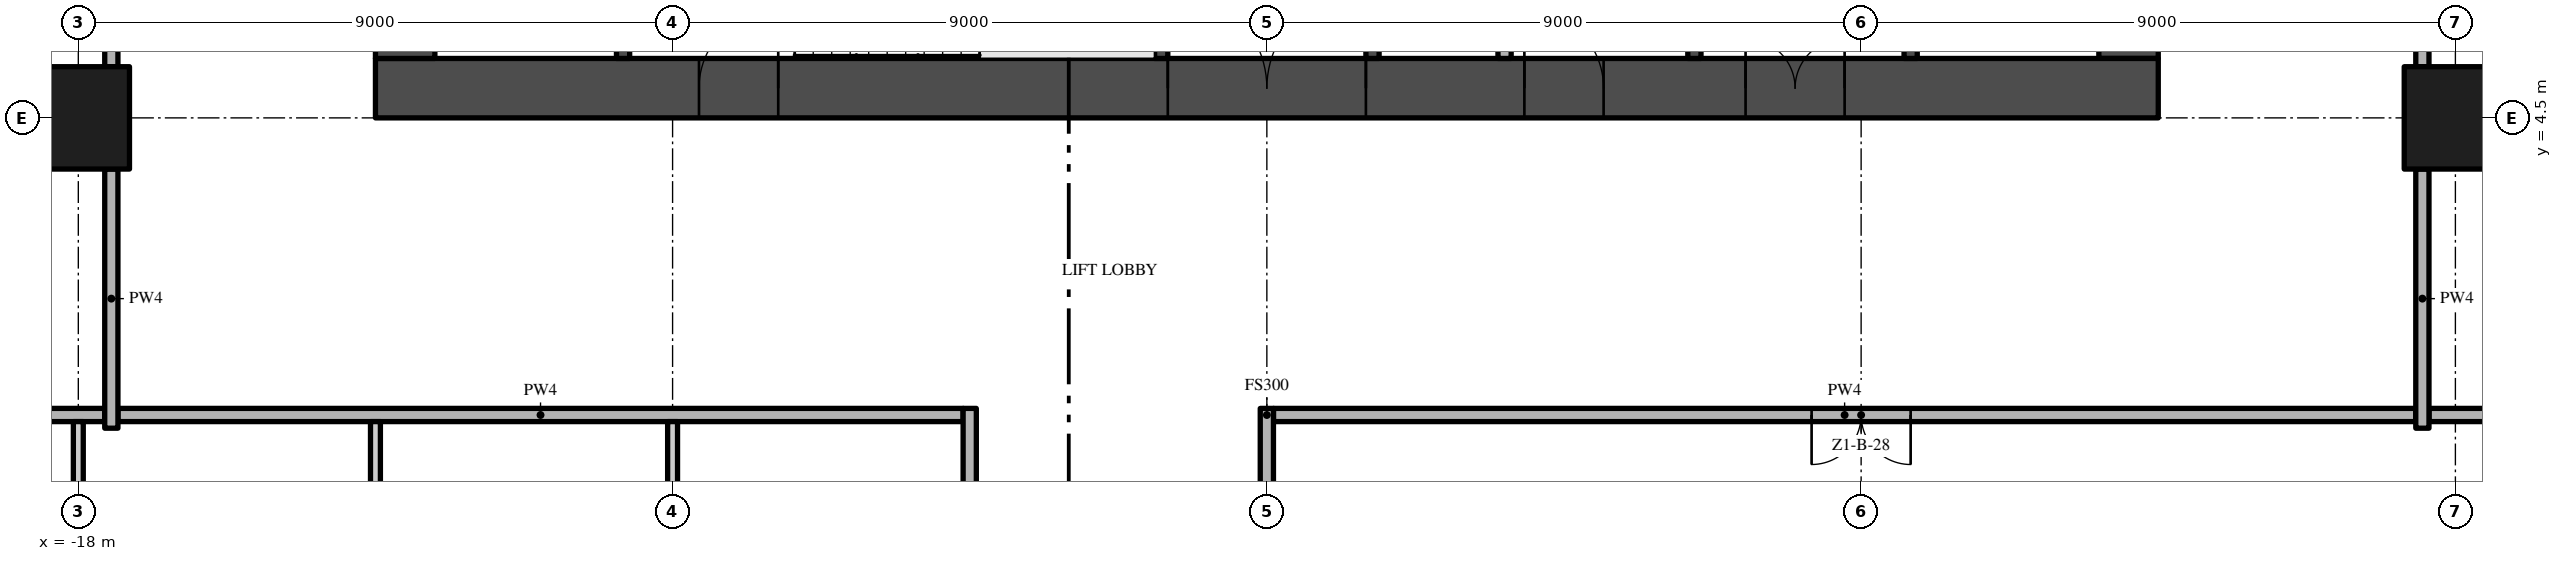
"""IFC4 building model, lengths in metres.
Left out: names, types, materials, properties, quantities, classifications, styles, units other than length and angle.
Written with IfcOpenShell. Run it as: python <this file> out.ifc"""

import sys

from ifc_helpers import new_model, si_unit, direction, frame, frame_2d, origin, origin_2d, place, context, subcontext, project, spatial, rectangle, extrude, element, fill, save


model = new_model("IFC4")
c1 = context("Model", 3, precision=1e-05, world=origin(), true_north=direction((0.0, 1.0)))
c2 = subcontext(c1, "Body", "Model", "MODEL_VIEW")
j1 = project(units=[si_unit("LENGTHUNIT", "METRE"), si_unit("PLANEANGLEUNIT", "RADIAN")], contexts=[c1])
p1 = place(None, origin())
s1 = spatial("IfcSite", under=j1, at=p1, CompositionType="ELEMENT")
p2 = place(p1, origin())
s2 = spatial("IfcBuilding", under=s1, at=p2, CompositionType="ELEMENT")
p3 = place(p2, frame((0.0, 0.0, 26.4)))
s3 = spatial("IfcBuildingStorey", under=s2, at=p3, CompositionType="ELEMENT", Elevation=26.4)
p4 = place(p3, frame((-13.5, 4.95, -0.3), z_axis=(0.0, 0.0, 1.0), x_axis=(1.0, 0.0, 0.0)))
e1 = element("IfcWall", 1, at=p4, inside=s3, PredefinedType="SHEAR", context=c2, shape_type="SweptSolid", body=[
    extrude(rectangle(XDim=27.0, YDim=0.9, at=frame_2d((13.5, 0.0))), origin(), (0.0, 0.0, 1.0), 3.8),
])
p5 = place(p4, frame((12.0, 0.0, 0.3)))
e2 = element("IfcOpeningElement", 2, at=p5, cuts=e1, PredefinedType="OPENING", context=c2, shape_type="SweptSolid", body=[
    extrude(rectangle(XDim=3.0, YDim=2.4, at=frame_2d((1.5, 1.2))), frame((0.0, 0.46, 0.0), z_axis=(0.0, -1.0, 0.0), x_axis=(1.0, 0.0, 0.0)), (0.0, 0.0, 1.0), 0.92),
])
p6 = place(p4, frame((4.9, 0.0, 0.3)))
e3 = element("IfcOpeningElement", 3, at=p6, cuts=e1, PredefinedType="OPENING", context=c2, shape_type="SweptSolid", body=[
    extrude(rectangle(XDim=1.2, YDim=2.2, at=frame_2d((0.6, 1.1))), frame((0.0, 0.46, 0.0), z_axis=(0.0, -1.0, 0.0), x_axis=(1.0, 0.0, 0.0)), (0.0, 0.0, 1.0), 0.92),
])
p7 = place(p4, frame((20.75, 0.0, 0.3)))
e4 = element("IfcOpeningElement", 4, at=p7, cuts=e1, PredefinedType="OPENING", context=c2, shape_type="SweptSolid", body=[
    extrude(rectangle(XDim=1.5, YDim=2.2, at=frame_2d((0.75, 1.1))), frame((0.0, 0.46, 0.0), z_axis=(0.0, -1.0, 0.0), x_axis=(1.0, 0.0, 0.0)), (0.0, 0.0, 1.0), 0.92),
])
p8 = place(p4, frame((17.4, 0.0, 0.3)))
e5 = element("IfcOpeningElement", 5, at=p8, cuts=e1, PredefinedType="OPENING", context=c2, shape_type="SweptSolid", body=[
    extrude(rectangle(XDim=1.2, YDim=2.2, at=frame_2d((0.6, 1.1))), frame((0.0, 0.46, 0.0), z_axis=(0.0, -1.0, 0.0), x_axis=(1.0, 0.0, 0.0)), (0.0, 0.0, 1.0), 0.92),
])
p9 = place(p3, frame((13.05, 5.4, -0.3), z_axis=(0.0, 0.0, 1.0), x_axis=(0.0, 1.0, 0.0)))
e6 = element("IfcWall", 6, at=p9, inside=s3, PredefinedType="SHEAR", context=c2, shape_type="SweptSolid", body=[
    extrude(rectangle(XDim=16.2, YDim=0.9, at=frame_2d((8.1, 0.0))), origin(), (0.0, 0.0, 1.0), 3.8),
])
p10 = place(p9, frame((6.0, 0.0, 0.3)))
e7 = element("IfcOpeningElement", 7, at=p10, cuts=e6, PredefinedType="OPENING", context=c2, shape_type="SweptSolid", body=[
    extrude(rectangle(XDim=1.2, YDim=2.2, at=frame_2d((0.6, 1.1))), frame((0.0, 0.46, 0.0), z_axis=(0.0, -1.0, 0.0), x_axis=(1.0, 0.0, 0.0)), (0.0, 0.0, 1.0), 0.92),
])
p11 = place(p3, frame((-13.05, 21.6, -0.3), z_axis=(0.0, 0.0, 1.0), x_axis=(0.0, -1.0, 0.0)))
e8 = element("IfcWall", 8, at=p11, inside=s3, PredefinedType="SHEAR", context=c2, shape_type="SweptSolid", body=[
    extrude(rectangle(XDim=16.2, YDim=0.9, at=frame_2d((8.1, 0.0))), origin(), (0.0, 0.0, 1.0), 3.8),
])
p12 = place(p11, frame((9.0, 0.0, 0.3)))
e9 = element("IfcOpeningElement", 9, at=p12, cuts=e8, PredefinedType="OPENING", context=c2, shape_type="SweptSolid", body=[
    extrude(rectangle(XDim=1.2, YDim=2.2, at=frame_2d((0.6, 1.1))), frame((0.0, 0.46, 0.0), z_axis=(0.0, -1.0, 0.0), x_axis=(1.0, 0.0, 0.0)), (0.0, 0.0, 1.0), 0.92),
])
for number, where, z_axis, x_axis in (
    (10, (-18.0, 4.5, 0.0), (0.0, 0.0, 1.0), (1.0, 0.0, 0.0)),
    (11, (18.0, 4.5, 0.0), (0.0, 0.0, 1.0), (1.0, 0.0, 0.0)),
):
    element("IfcColumn", number, at=place(p3, frame(where, z_axis=z_axis, x_axis=x_axis)), inside=s3, PredefinedType="COLUMN", context=c2, shape_type="SweptSolid", body=[
        extrude(rectangle(XDim=1.55, YDim=1.55, at=origin_2d()), origin(), (0.0, 0.0, 1.0), 3.5),
    ])
for number, where, z_axis, x_axis in (
    (12, (-9.75, 5.4, 0.0), (0.0, 0.0, 1.0), (0.0, 1.0, 0.0)),
    (13, (-1.6, 5.4, 0.0), (0.0, 0.0, 1.0), (0.0, 1.0, 0.0)),
):
    element("IfcWall", number, at=place(p3, frame(where, z_axis=z_axis, x_axis=x_axis)), inside=s3, PredefinedType="SHEAR", context=c2, shape_type="SweptSolid", body=[
        extrude(rectangle(XDim=2.55, YDim=0.2, at=frame_2d((1.275, 0.0))), origin(), (0.0, 0.0, 1.0), 3.5),
    ])
p13 = place(p3, frame((1.6, 13.5, 0.0), z_axis=(0.0, 0.0, 1.0), x_axis=(0.0, -1.0, 0.0)))
e14 = element("IfcWall", 14, at=p13, inside=s3, PredefinedType="SHEAR", context=c2, shape_type="SweptSolid", body=[
    extrude(rectangle(XDim=8.1, YDim=0.2, at=frame_2d((4.05, 0.0))), origin(), (0.0, 0.0, 1.0), 3.5),
])
p14 = place(p13, frame((3.2, 0.0, 0.0)))
e15 = element("IfcOpeningElement", 15, at=p14, cuts=e14, PredefinedType="OPENING", context=c2, shape_type="SweptSolid", body=[
    extrude(rectangle(XDim=0.9, YDim=2.1, at=frame_2d((0.45, 1.05))), frame((0.0, 0.11, 0.0), z_axis=(0.0, -1.0, 0.0), x_axis=(1.0, 0.0, 0.0)), (0.0, 0.0, 1.0), 0.22),
])
p15 = place(p3, frame((3.6, 13.5, 0.0), z_axis=(0.0, 0.0, 1.0), x_axis=(0.0, -1.0, 0.0)))
e16 = element("IfcWall", 16, at=p15, inside=s3, PredefinedType="PARTITIONING", context=c2, shape_type="SweptSolid", body=[
    extrude(rectangle(XDim=8.1, YDim=0.2, at=frame_2d((4.05, 0.0))), origin(), (0.0, 0.0, 1.0), 3.5),
])
p16 = place(p15, frame((3.6, 0.0, 0.0)))
e17 = element("IfcOpeningElement", 17, at=p16, cuts=e16, PredefinedType="OPENING", context=c2, shape_type="SweptSolid", body=[
    extrude(rectangle(XDim=0.9, YDim=2.1, at=frame_2d((0.45, 1.05))), frame((0.0, 0.11, 0.0), z_axis=(0.0, -1.0, 0.0), x_axis=(1.0, 0.0, 0.0)), (0.0, 0.0, 1.0), 0.22),
])
p17 = place(p3, frame((6.475, 5.4, 0.0), z_axis=(0.0, 0.0, 1.0), x_axis=(0.0, 1.0, 0.0)))
e18 = element("IfcWall", 18, at=p17, inside=s3, PredefinedType="SHEAR", context=c2, shape_type="SweptSolid", body=[
    extrude(rectangle(XDim=6.7, YDim=0.2, at=frame_2d((3.35, 0.0))), origin(), (0.0, 0.0, 1.0), 3.5),
])
p18 = place(p3, frame((9.75, 5.4, 0.0), z_axis=(0.0, 0.0, 1.0), x_axis=(0.0, 1.0, 0.0)))
e19 = element("IfcWall", 19, at=p18, inside=s3, PredefinedType="SHEAR", context=c2, shape_type="SweptSolid", body=[
    extrude(rectangle(XDim=2.2, YDim=0.2, at=frame_2d((1.1, 0.0))), origin(), (0.0, 0.0, 1.0), 3.5),
])
p19 = place(p18, frame((0.55, 0.0, 0.0)))
e20 = element("IfcOpeningElement", 20, at=p19, cuts=e19, PredefinedType="OPENING", context=c2, shape_type="SweptSolid", body=[
    extrude(rectangle(XDim=1.1, YDim=2.1, at=frame_2d((0.55, 1.05))), frame((0.0, 0.11, 0.0), z_axis=(0.0, -1.0, 0.0), x_axis=(1.0, 0.0, 0.0)), (0.0, 0.0, 1.0), 0.22),
])
p20 = place(p3, frame((-17.4, 0.0, 0.0), z_axis=(0.0, 0.0, 1.0), x_axis=(1.0, 0.0, 0.0)))
e21 = element("IfcWall", 21, at=p20, inside=s3, PredefinedType="PARTITIONING", context=c2, shape_type="SweptSolid", body=[
    extrude(rectangle(XDim=12.8, YDim=0.2, at=frame_2d((6.4, 0.0))), origin(), (0.0, 0.0, 1.0), 3.5),
])
p21 = place(p3, frame((17.4, 0.0, 0.0), z_axis=(0.0, 0.0, 1.0), x_axis=(-1.0, 0.0, 0.0)))
e22 = element("IfcWall", 22, at=p21, inside=s3, PredefinedType="PARTITIONING", context=c2, shape_type="SweptSolid", body=[
    extrude(rectangle(XDim=17.3, YDim=0.2, at=frame_2d((8.65, 0.0))), origin(), (0.0, 0.0, 1.0), 3.5),
])
p22 = place(p21, frame((7.65, 0.0, 0.0)))
e23 = element("IfcOpeningElement", 23, at=p22, cuts=e22, PredefinedType="OPENING", context=c2, shape_type="SweptSolid", body=[
    extrude(rectangle(XDim=1.5, YDim=2.4, at=frame_2d((0.75, 1.2))), frame((0.0, 0.11, 0.0), z_axis=(0.0, -1.0, 0.0), x_axis=(1.0, 0.0, 0.0)), (0.0, 0.0, 1.0), 0.22),
])
for number, where, z_axis, x_axis in (
    (24, (-26.7, 0.0, 0.0), (0.0, 0.0, 1.0), (1.0, 0.0, 0.0)),
    (25, (17.6, 0.0, 0.0), (0.0, 0.0, 1.0), (1.0, 0.0, 0.0)),
):
    element("IfcWall", number, at=place(p3, frame(where, z_axis=z_axis, x_axis=x_axis)), inside=s3, PredefinedType="PARTITIONING", context=c2, shape_type="SweptSolid", body=[
        extrude(rectangle(XDim=9.1, YDim=0.2, at=frame_2d((4.55, 0.0))), origin(), (0.0, 0.0, 1.0), 3.5),
    ])
p23 = place(p3, frame((-18.0, -3.725, 0.0), z_axis=(0.0, 0.0, 1.0), x_axis=(0.0, 1.0, 0.0)))
e26 = element("IfcWall", 26, at=p23, inside=s3, PredefinedType="PARTITIONING", context=c2, shape_type="SweptSolid", body=[
    extrude(rectangle(XDim=3.625, YDim=0.15, at=frame_2d((1.812, 0.0))), origin(), (0.0, 0.0, 1.0), 3.5),
])
p24 = place(p23, frame((0.75, 0.0, 0.0)))
e27 = element("IfcOpeningElement", 27, at=p24, cuts=e26, PredefinedType="OPENING", context=c2, shape_type="SweptSolid", body=[
    extrude(rectangle(XDim=1.5, YDim=2.4, at=frame_2d((0.75, 1.2))), frame((0.0, 0.085, 0.0), z_axis=(0.0, -1.0, 0.0), x_axis=(1.0, 0.0, 0.0)), (0.0, 0.0, 1.0), 0.17),
])
p25 = place(p3, frame((-17.5, -0.2, 0.0), z_axis=(0.0, 0.0, 1.0), x_axis=(0.0, 1.0, 0.0)))
e28 = element("IfcWall", 28, at=p25, inside=s3, PredefinedType="PARTITIONING", context=c2, shape_type="SweptSolid", body=[
    extrude(rectangle(XDim=3.925, YDim=0.2, at=frame_2d((1.962, 0.0))), origin(), (0.0, 0.0, 1.0), 3.5),
])
p26 = place(p3, frame((-17.5, 5.275, 0.0), z_axis=(0.0, 0.0, 1.0), x_axis=(0.0, 1.0, 0.0)))
e29 = element("IfcWall", 29, at=p26, inside=s3, PredefinedType="PARTITIONING", context=c2, shape_type="SweptSolid", body=[
    extrude(rectangle(XDim=7.45, YDim=0.2, at=frame_2d((3.725, 0.0))), origin(), (0.0, 0.0, 1.0), 3.5),
])
p27 = place(p26, frame((3.125, 0.0, 0.0)))
e30 = element("IfcOpeningElement", 30, at=p27, cuts=e29, PredefinedType="OPENING", context=c2, shape_type="SweptSolid", body=[
    extrude(rectangle(XDim=1.2, YDim=2.4, at=frame_2d((0.6, 1.2))), frame((0.0, 0.11, 0.0), z_axis=(0.0, -1.0, 0.0), x_axis=(1.0, 0.0, 0.0)), (0.0, 0.0, 1.0), 0.22),
])
p28 = place(p3, frame((-13.5, -0.1, 0.0), z_axis=(0.0, 0.0, 1.0), x_axis=(0.0, -1.0, 0.0)))
e31 = element("IfcWall", 31, at=p28, inside=s3, PredefinedType="PARTITIONING", context=c2, shape_type="SweptSolid", body=[
    extrude(rectangle(XDim=8.525, YDim=0.15, at=frame_2d((4.263, 0.0))), origin(), (0.0, 0.0, 1.0), 3.5),
])
p29 = place(p28, frame((4.0, 0.0, 0.0)))
e32 = element("IfcOpeningElement", 32, at=p29, cuts=e31, PredefinedType="OPENING", context=c2, shape_type="SweptSolid", body=[
    extrude(rectangle(XDim=0.8, YDim=2.0, at=frame_2d((0.4, 1.0))), frame((0.0, 0.085, 0.0), z_axis=(0.0, -1.0, 0.0), x_axis=(1.0, 0.0, 0.0)), (0.0, 0.0, 1.0), 0.17),
])
p30 = place(p3, frame((-9.0, -3.725, 0.0), z_axis=(0.0, 0.0, 1.0), x_axis=(0.0, 1.0, 0.0)))
e33 = element("IfcWall", 33, at=p30, inside=s3, PredefinedType="PARTITIONING", context=c2, shape_type="SweptSolid", body=[
    extrude(rectangle(XDim=3.625, YDim=0.15, at=frame_2d((1.812, 0.0))), origin(), (0.0, 0.0, 1.0), 3.5),
])
p31 = place(p30, frame((1.775, 0.0, 0.0)))
e34 = element("IfcOpeningElement", 34, at=p31, cuts=e33, PredefinedType="OPENING", context=c2, shape_type="SweptSolid", body=[
    extrude(rectangle(XDim=0.9, YDim=2.1, at=frame_2d((0.45, 1.05))), frame((0.0, 0.085, 0.0), z_axis=(0.0, -1.0, 0.0), x_axis=(1.0, 0.0, 0.0)), (0.0, 0.0, 1.0), 0.17),
])
p32 = place(p3, frame((-4.5, -22.2, 0.0), z_axis=(0.0, 0.0, 1.0), x_axis=(0.0, 1.0, 0.0)))
e35 = element("IfcWall", 35, at=p32, inside=s3, PredefinedType="PARTITIONING", context=c2, shape_type="SweptSolid", body=[
    extrude(rectangle(XDim=22.3, YDim=0.2, at=frame_2d((11.15, 0.0))), origin(), (0.0, 0.0, 1.0), 3.5),
])
p33 = place(p32, frame((10.2, 0.0, 0.0)))
e36 = element("IfcOpeningElement", 36, at=p33, cuts=e35, PredefinedType="OPENING", context=c2, shape_type="SweptSolid", body=[
    extrude(rectangle(XDim=1.5, YDim=2.4, at=frame_2d((0.75, 1.2))), frame((0.0, 0.11, 0.0), z_axis=(0.0, -1.0, 0.0), x_axis=(1.0, 0.0, 0.0)), (0.0, 0.0, 1.0), 0.22),
])
p34 = place(p3, frame((0.0, -3.725, 0.0), z_axis=(0.0, 0.0, 1.0), x_axis=(0.0, 1.0, 0.0)))
e37 = element("IfcWall", 37, at=p34, inside=s3, PredefinedType="PARTITIONING", context=c2, shape_type="SweptSolid", body=[
    extrude(rectangle(XDim=3.825, YDim=0.2, at=frame_2d((1.913, 0.0))), origin(), (0.0, 0.0, 1.0), 3.5),
])
p35 = place(p3, frame((17.5, -0.2, 0.0), z_axis=(0.0, 0.0, 1.0), x_axis=(0.0, 1.0, 0.0)))
e38 = element("IfcWall", 38, at=p35, inside=s3, PredefinedType="PARTITIONING", context=c2, shape_type="SweptSolid", body=[
    extrude(rectangle(XDim=3.925, YDim=0.2, at=frame_2d((1.962, 0.0))), origin(), (0.0, 0.0, 1.0), 3.5),
])
p36 = place(p3, frame((17.5, 5.275, 0.0), z_axis=(0.0, 0.0, 1.0), x_axis=(0.0, 1.0, 0.0)))
e39 = element("IfcWall", 39, at=p36, inside=s3, PredefinedType="PARTITIONING", context=c2, shape_type="SweptSolid", body=[
    extrude(rectangle(XDim=7.45, YDim=0.2, at=frame_2d((3.725, 0.0))), origin(), (0.0, 0.0, 1.0), 3.5),
])
p37 = place(p5, frame((3.0, 0.0, 0.0), z_axis=(0.0, 0.0, 1.0), x_axis=(-1.0, 0.0, 0.0)))
e40 = element("IfcDoor", 40, at=p37, inside=s3, OperationType="DOUBLE_DOOR_SINGLE_SWING", PredefinedType="DOOR", context=c2, shape_type="SweptSolid", body=[
    extrude(rectangle(XDim=3.0, YDim=2.4, at=frame_2d((1.5, 1.2))), frame((0.0, 0.025, 0.0), z_axis=(0.0, -1.0, 0.0), x_axis=(1.0, 0.0, 0.0)), (0.0, 0.0, 1.0), 0.05),
])
fill(e2, e40)
p38 = place(p6, frame((1.2, 0.0, 0.0), z_axis=(0.0, 0.0, 1.0), x_axis=(-1.0, 0.0, 0.0)))
e41 = element("IfcDoor", 41, at=p38, inside=s3, OperationType="SINGLE_SWING_LEFT", PredefinedType="DOOR", context=c2, shape_type="SweptSolid", body=[
    extrude(rectangle(XDim=1.2, YDim=2.2, at=frame_2d((0.6, 1.1))), frame((0.0, 0.025, 0.0), z_axis=(0.0, -1.0, 0.0), x_axis=(1.0, 0.0, 0.0)), (0.0, 0.0, 1.0), 0.05),
])
fill(e3, e41)
p39 = place(p7, frame((1.5, 0.0, 0.0), z_axis=(0.0, 0.0, 1.0), x_axis=(-1.0, 0.0, 0.0)))
e42 = element("IfcDoor", 42, at=p39, inside=s3, OperationType="DOUBLE_DOOR_SINGLE_SWING", PredefinedType="DOOR", context=c2, shape_type="SweptSolid", body=[
    extrude(rectangle(XDim=1.5, YDim=2.2, at=frame_2d((0.75, 1.1))), frame((0.0, 0.025, 0.0), z_axis=(0.0, -1.0, 0.0), x_axis=(1.0, 0.0, 0.0)), (0.0, 0.0, 1.0), 0.05),
])
fill(e4, e42)
p40 = place(p8, frame((1.2, 0.0, 0.0), z_axis=(0.0, 0.0, 1.0), x_axis=(-1.0, 0.0, 0.0)))
e43 = element("IfcDoor", 43, at=p40, inside=s3, OperationType="SINGLE_SWING_RIGHT", PredefinedType="DOOR", context=c2, shape_type="SweptSolid", body=[
    extrude(rectangle(XDim=1.2, YDim=2.2, at=frame_2d((0.6, 1.1))), frame((0.0, 0.025, 0.0), z_axis=(0.0, -1.0, 0.0), x_axis=(1.0, 0.0, 0.0)), (0.0, 0.0, 1.0), 0.05),
])
fill(e5, e43)
p41 = place(p22, origin())
e44 = element("IfcDoor", 44, at=p41, inside=s3, OperationType="DOUBLE_DOOR_SINGLE_SWING", PredefinedType="DOOR", context=c2, shape_type="SweptSolid", body=[
    extrude(rectangle(XDim=1.5, YDim=2.4, at=frame_2d((0.75, 1.2))), frame((0.0, 0.025, 0.0), z_axis=(0.0, -1.0, 0.0), x_axis=(1.0, 0.0, 0.0)), (0.0, 0.0, 1.0), 0.05),
])
fill(e23, e44)
save(model, sys.argv[1])
